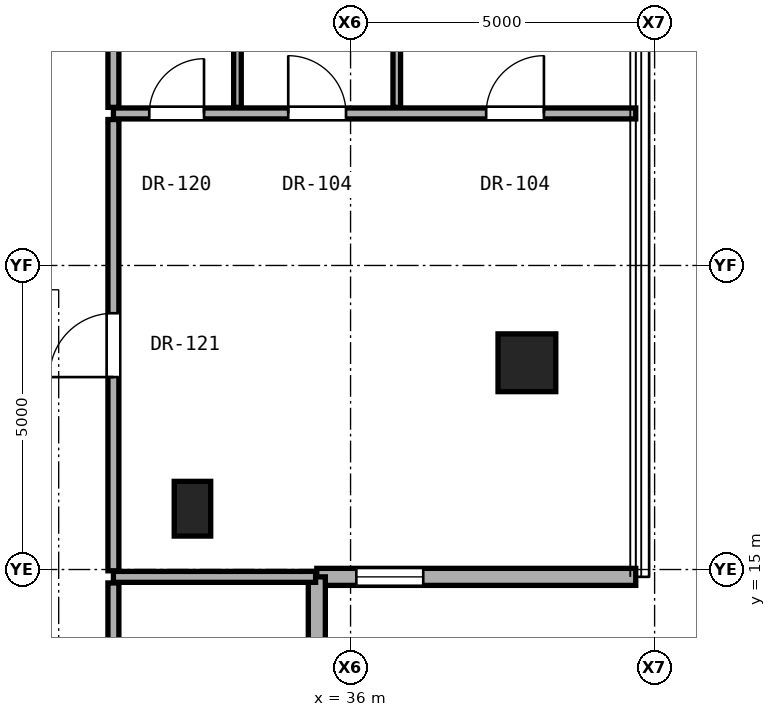
"""IFC4 building model, lengths in metres.
Left out: names, types, materials, properties, quantities, classifications, styles, units other than length and angle.
Written with IfcOpenShell. Run it as: python <this file> out.ifc"""

import sys

from ifc_helpers import new_model, si_unit, direction, frame, frame_2d, origin, origin_2d, place, context, subcontext, project, spatial, rectangle, hollow_rectangle, extrude, element, fill, save


model = new_model("IFC4")
c1 = context("Model", 3, precision=1e-05, world=origin(), true_north=direction((0.0, 1.0)))
c2 = subcontext(c1, "Body", "Model", "MODEL_VIEW")
j1 = project(units=[si_unit("LENGTHUNIT", "METRE"), si_unit("PLANEANGLEUNIT", "RADIAN")], contexts=[c1])
p1 = place(None, origin())
s1 = spatial("IfcSite", under=j1, at=p1, CompositionType="ELEMENT")
p2 = place(p1, origin())
s2 = spatial("IfcBuilding", under=s1, at=p2, CompositionType="ELEMENT")
p3 = place(p2, frame((0.0, 0.0, 160.9)))
s3 = spatial("IfcBuildingStorey", under=s2, at=p3, CompositionType="ELEMENT", Elevation=160.9)
p4 = place(p3, frame((38.9, 18.4, 0.0), z_axis=(0.0, 0.0, 1.0), x_axis=(1.0, 0.0, 0.0)))
e1 = element("IfcColumn", 1, at=p4, inside=s3, PredefinedType="COLUMN", context=c2, shape_type="SweptSolid", body=[
    extrude(hollow_rectangle(XDim=0.95, YDim=0.95, WallThickness=0.05, at=origin_2d()), origin(), (0.0, 0.0, 1.0), 3.25),
])
p5 = place(p3, frame((33.4, 16.0, 0.0), z_axis=(0.0, 0.0, 1.0), x_axis=(1.0, 0.0, 0.0)))
e2 = element("IfcColumn", 2, at=p5, inside=s3, PredefinedType="PILASTER", context=c2, shape_type="SweptSolid", body=[
    extrude(rectangle(XDim=0.6, YDim=0.9, at=origin_2d()), origin(), (0.0, 0.0, 1.0), 3.25),
])
p6 = place(p3, frame((35.445, 14.879, 0.0), z_axis=(0.0, 0.0, 1.0), x_axis=(1.0, 0.0, 0.0)))
e3 = element("IfcWall", 3, at=p6, inside=s3, PredefinedType="SOLIDWALL", context=c2, shape_type="SweptSolid", body=[
    extrude(rectangle(XDim=5.245, YDim=0.28, at=frame_2d((2.623, 0.0))), origin(), (0.0, 0.0, 1.0), 3.03),
])
p7 = place(p6, frame((0.65, 0.0, 0.85)))
e4 = element("IfcOpeningElement", 4, at=p7, cuts=e3, PredefinedType="OPENING", context=c2, shape_type="SweptSolid", body=[
    extrude(rectangle(XDim=1.1, YDim=2.0, at=frame_2d((0.55, 1.0))), frame((0.0, 0.15, 0.0), z_axis=(0.0, -1.0, 0.0), x_axis=(1.0, 0.0, 0.0)), (0.0, 0.0, 1.0), 0.3),
])
p8 = place(p3, frame((35.445, 9.634, 0.0), z_axis=(0.0, 0.0, 1.0), x_axis=(0.0, 1.0, 0.0)))
e5 = element("IfcWall", 5, at=p8, inside=s3, PredefinedType="SOLIDWALL", context=c2, shape_type="SweptSolid", body=[
    extrude(rectangle(XDim=5.245, YDim=0.28, at=frame_2d((2.623, 0.0))), origin(), (0.0, 0.0, 1.0), 3.03),
])
p9 = place(p3, frame((32.1, 14.879, 0.0), z_axis=(0.0, 0.0, 1.0), x_axis=(1.0, 0.0, 0.0)))
e6 = element("IfcWall", 6, at=p9, inside=s3, PredefinedType="PARTITIONING", context=c2, shape_type="SweptSolid", body=[
    extrude(rectangle(XDim=3.325, YDim=0.18, at=frame_2d((1.663, 0.0))), origin(), (0.0, 0.0, 1.0), 3.05),
])
p10 = place(p3, frame((32.1, 22.5, 0.0), z_axis=(0.0, 0.0, 1.0), x_axis=(1.0, 0.0, 0.0)))
e7 = element("IfcWall", 7, at=p10, inside=s3, PredefinedType="PARTITIONING", context=c2, shape_type="SweptSolid", body=[
    extrude(rectangle(XDim=8.59, YDim=0.18, at=frame_2d((4.295, 0.0))), origin(), (0.0, 0.0, 1.0), 2.269),
])
p11 = place(p10, frame((6.13, 0.0, 0.0)))
e8 = element("IfcOpeningElement", 8, at=p11, cuts=e7, PredefinedType="OPENING", context=c2, shape_type="SweptSolid", body=[
    extrude(rectangle(XDim=0.95, YDim=2.15, at=frame_2d((0.475, 1.075))), frame((0.0, 0.1, 0.0), z_axis=(0.0, -1.0, 0.0), x_axis=(1.0, 0.0, 0.0)), (0.0, 0.0, 1.0), 0.2),
])
p12 = place(p10, frame((2.875, 0.0, 0.0)))
e9 = element("IfcOpeningElement", 9, at=p12, cuts=e7, PredefinedType="OPENING", context=c2, shape_type="SweptSolid", body=[
    extrude(rectangle(XDim=0.95, YDim=2.15, at=frame_2d((0.475, 1.075))), frame((0.0, 0.1, 0.0), z_axis=(0.0, -1.0, 0.0), x_axis=(1.0, 0.0, 0.0)), (0.0, 0.0, 1.0), 0.2),
])
p13 = place(p10, frame((0.59, 0.0, 0.0)))
e10 = element("IfcOpeningElement", 10, at=p13, cuts=e7, PredefinedType="OPENING", context=c2, shape_type="SweptSolid", body=[
    extrude(rectangle(XDim=0.9, YDim=2.1, at=frame_2d((0.45, 1.05))), frame((0.0, 0.1, 0.0), z_axis=(0.0, -1.0, 0.0), x_axis=(1.0, 0.0, 0.0)), (0.0, 0.0, 1.0), 0.2),
])
p14 = place(p3, frame((32.1, 9.634, 0.0), z_axis=(0.0, 0.0, 1.0), x_axis=(0.0, 1.0, 0.0)))
e11 = element("IfcWall", 11, at=p14, inside=s3, PredefinedType="PARTITIONING", context=c2, shape_type="SweptSolid", body=[
    extrude(rectangle(XDim=5.145, YDim=0.18, at=frame_2d((2.573, 0.0))), origin(), (0.0, 0.0, 1.0), 3.05),
])
p15 = place(p14, frame((2.097, 0.0, 0.0)))
e12 = element("IfcOpeningElement", 12, at=p15, cuts=e11, PredefinedType="OPENING", context=c2, shape_type="SweptSolid", body=[
    extrude(rectangle(XDim=0.95, YDim=2.15, at=frame_2d((0.475, 1.075))), frame((0.0, 0.1, 0.0), z_axis=(0.0, -1.0, 0.0), x_axis=(1.0, 0.0, 0.0)), (0.0, 0.0, 1.0), 0.2),
])
p16 = place(p3, frame((32.1, 14.979, 0.0), z_axis=(0.0, 0.0, 1.0), x_axis=(0.0, 1.0, 0.0)))
e13 = element("IfcWall", 13, at=p16, inside=s3, PredefinedType="PARTITIONING", context=c2, shape_type="SweptSolid", body=[
    extrude(rectangle(XDim=7.421, YDim=0.18, at=frame_2d((3.71, 0.0))), origin(), (0.0, 0.0, 1.0), 2.442),
])
p17 = place(p16, frame((3.186, 0.0, 0.0)))
e14 = element("IfcOpeningElement", 14, at=p17, cuts=e13, PredefinedType="OPENING", context=c2, shape_type="SweptSolid", body=[
    extrude(rectangle(XDim=1.05, YDim=2.2, at=frame_2d((0.525, 1.1))), frame((0.0, 0.1, 0.0), z_axis=(0.0, -1.0, 0.0), x_axis=(1.0, 0.0, 0.0)), (0.0, 0.0, 1.0), 0.2),
])
p18 = place(p3, frame((32.1, 22.6, 0.0), z_axis=(0.0, 0.0, 1.0), x_axis=(0.0, 1.0, 0.0)))
e15 = element("IfcWall", 15, at=p18, inside=s3, PredefinedType="PARTITIONING", context=c2, shape_type="SweptSolid", body=[
    extrude(rectangle(XDim=2.127, YDim=0.18, at=frame_2d((1.064, 0.0))), origin(), (0.0, 0.0, 1.0), 2.346),
])
for number, where, z_axis, x_axis in (
    (16, (34.14, 22.6, 0.0), (0.0, 0.0, 1.0), (0.0, 1.0, 0.0)),
    (17, (36.76, 22.6, 0.0), (0.0, 0.0, 1.0), (0.0, 1.0, 0.0)),
):
    element("IfcWall", number, at=place(p3, frame(where, z_axis=z_axis, x_axis=x_axis)), inside=s3, PredefinedType="PARTITIONING", context=c2, shape_type="SweptSolid", body=[
        extrude(rectangle(XDim=2.127, YDim=0.125, at=frame_2d((1.064, 0.0))), origin(), (0.0, 0.0, 1.0), 2.346),
    ])
p19 = place(p7, origin())
e18 = element("IfcWindow", 18, at=p19, inside=s3, PartitioningType="SINGLE_PANEL", PredefinedType="WINDOW", context=c2, shape_type="SweptSolid", body=[
    extrude(rectangle(XDim=1.1, YDim=2.0, at=frame_2d((0.55, 1.0))), frame((0.0, 0.03, 0.0), z_axis=(0.0, -1.0, 0.0), x_axis=(1.0, 0.0, 0.0)), (0.0, 0.0, 1.0), 0.06),
])
fill(e4, e18)
p20 = place(p17, origin())
e19 = element("IfcDoor", 19, at=p20, inside=s3, OperationType="SINGLE_SWING_LEFT", PredefinedType="DOOR", context=c2, shape_type="SweptSolid", body=[
    extrude(rectangle(XDim=1.05, YDim=2.2, at=frame_2d((0.525, 1.1))), frame((0.0, 0.025, 0.0), z_axis=(0.0, -1.0, 0.0), x_axis=(1.0, 0.0, 0.0)), (0.0, 0.0, 1.0), 0.05),
])
fill(e14, e19)
p21 = place(p11, origin())
e20 = element("IfcDoor", 20, at=p21, inside=s3, OperationType="SINGLE_SWING_RIGHT", PredefinedType="DOOR", context=c2, shape_type="SweptSolid", body=[
    extrude(rectangle(XDim=0.95, YDim=2.15, at=frame_2d((0.475, 1.075))), frame((0.0, 0.025, 0.0), z_axis=(0.0, -1.0, 0.0), x_axis=(1.0, 0.0, 0.0)), (0.0, 0.0, 1.0), 0.05),
])
fill(e8, e20)
p22 = place(p12, origin())
e21 = element("IfcDoor", 21, at=p22, inside=s3, OperationType="SINGLE_SWING_LEFT", PredefinedType="DOOR", context=c2, shape_type="SweptSolid", body=[
    extrude(rectangle(XDim=0.95, YDim=2.15, at=frame_2d((0.475, 1.075))), frame((0.0, 0.025, 0.0), z_axis=(0.0, -1.0, 0.0), x_axis=(1.0, 0.0, 0.0)), (0.0, 0.0, 1.0), 0.05),
])
fill(e9, e21)
p23 = place(p13, origin())
e22 = element("IfcDoor", 22, at=p23, inside=s3, OperationType="SINGLE_SWING_RIGHT", PredefinedType="DOOR", context=c2, shape_type="SweptSolid", body=[
    extrude(rectangle(XDim=0.9, YDim=2.1, at=frame_2d((0.45, 1.05))), frame((0.0, 0.025, 0.0), z_axis=(0.0, -1.0, 0.0), x_axis=(1.0, 0.0, 0.0)), (0.0, 0.0, 1.0), 0.05),
])
fill(e10, e22)
save(model, sys.argv[1])
